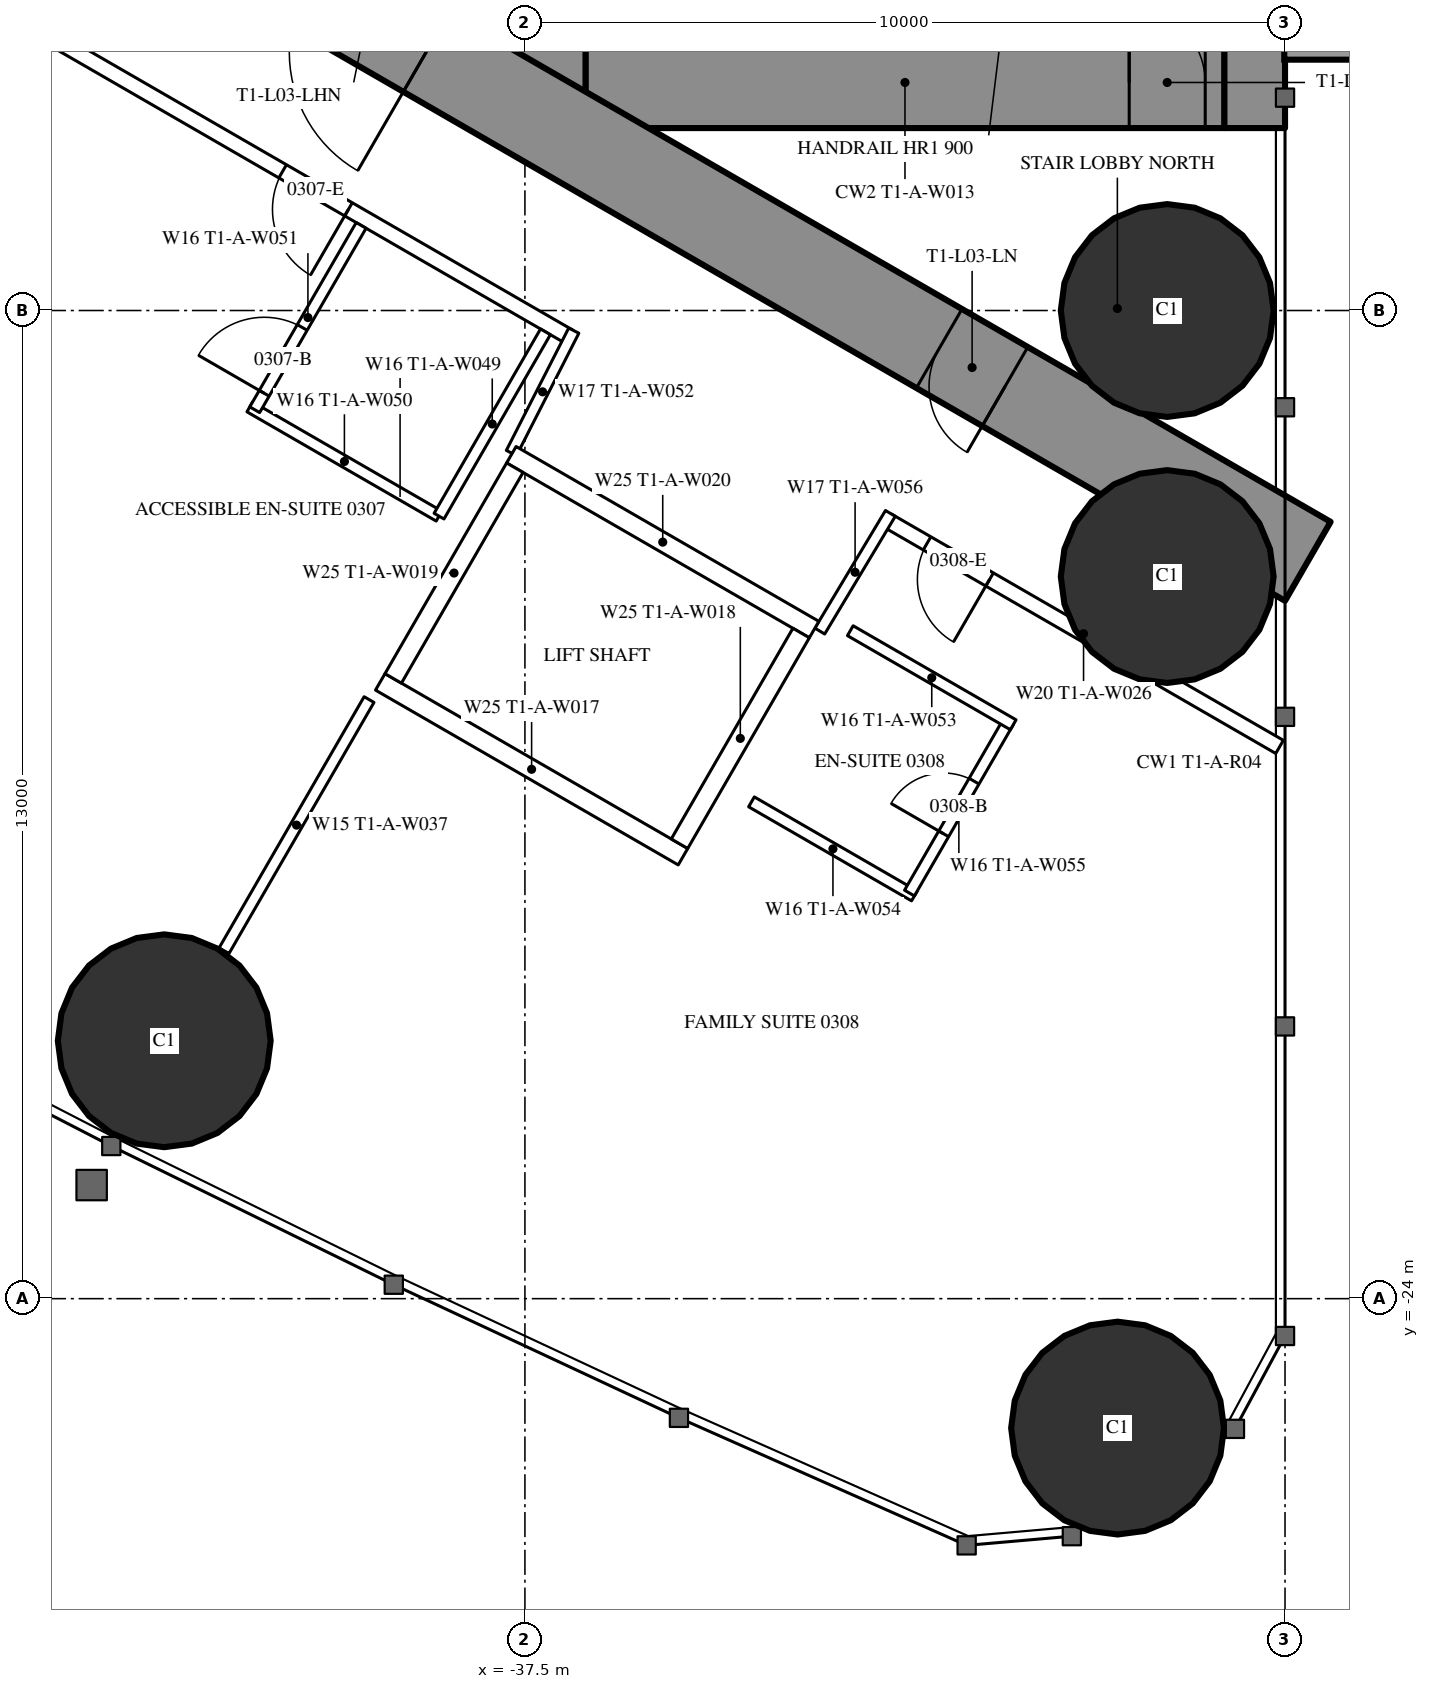
"""IFC4 building model, lengths in metres.
Left out: names, types, materials, properties, quantities, classifications, styles, units other than length and angle.
Written with IfcOpenShell. Run it as: python <this file> out.ifc"""

import sys

from ifc_helpers import new_model, si_unit, direction, frame, frame_2d, origin, origin_2d, place, context, subcontext, project, spatial, rectangle, hollow_circle, extrude, element, fill, save


model = new_model("IFC4")
c1 = context("Model", 3, precision=1e-05, world=origin(), true_north=direction((0.0, 1.0)))
c2 = subcontext(c1, "Body", "Model", "MODEL_VIEW")
j1 = project(units=[si_unit("LENGTHUNIT", "METRE"), si_unit("PLANEANGLEUNIT", "RADIAN")], contexts=[c1])
p1 = place(None, origin())
s1 = spatial("IfcSite", under=j1, at=p1, CompositionType="ELEMENT")
p2 = place(p1, origin())
s2 = spatial("IfcBuilding", under=s1, at=p2, CompositionType="ELEMENT")
p3 = place(p2, frame((0.0, 0.0, 18.0)))
s3 = spatial("IfcBuildingStorey", under=s2, at=p3, CompositionType="ELEMENT", Elevation=18.0)
for number, where, z_axis, x_axis in (
    (1, (-29.703, -25.703, 0.0), (0.0, 0.0, 1.0), (1.0, 0.0, 0.0)),
    (2, (-29.05, -11.0, 0.0), (0.0, 0.0, 1.0), (1.0, 0.0, 0.0)),
    (3, (-29.05, -14.5, 0.0), (0.0, 0.0, 1.0), (1.0, 0.0, 0.0)),
    (4, (-42.245, -20.607, 0.0), (0.0, 0.0, 1.0), (1.0, 0.0, 0.0)),
):
    element("IfcColumn", number, at=place(p3, frame(where, z_axis=z_axis, x_axis=x_axis)), inside=s3, PredefinedType="COLUMN", context=c2, shape_type="SweptSolid", body=[
        extrude(hollow_circle(Radius=1.4, WallThickness=0.12, at=origin_2d()), origin(), (0.0, 0.0, 1.0), 3.5),
    ])
p4 = place(p3, frame((-27.9, 8.6, 0.0), z_axis=(0.0, 0.0, 1.0), x_axis=(0.0, -1.0, 0.0)))
e5 = element("IfcWall", 5, at=p4, inside=s3, PredefinedType="SHEAR", context=c2, shape_type="SweptSolid", body=[
    extrude(rectangle(XDim=17.2, YDim=0.8, at=frame_2d((8.6, 0.0))), origin(), (0.0, 0.0, 1.0), 3.5),
])
p5 = place(p4, frame((2.45, 0.0, 0.6)))
e6 = element("IfcOpeningElement", 6, at=p5, cuts=e5, PredefinedType="OPENING", context=c2, shape_type="SweptSolid", body=[
    extrude(rectangle(XDim=0.6, YDim=2.1, at=frame_2d((0.3, 1.05))), frame((0.0, 0.41, 0.0), z_axis=(0.0, -1.0, 0.0), x_axis=(1.0, 0.0, 0.0)), (0.0, 0.0, 1.0), 0.82),
])
p6 = place(p4, frame((14.15, 0.0, 0.6)))
e7 = element("IfcOpeningElement", 7, at=p6, cuts=e5, PredefinedType="OPENING", context=c2, shape_type="SweptSolid", body=[
    extrude(rectangle(XDim=0.6, YDim=2.1, at=frame_2d((0.3, 1.05))), frame((0.0, 0.41, 0.0), z_axis=(0.0, -1.0, 0.0), x_axis=(1.0, 0.0, 0.0)), (0.0, 0.0, 1.0), 0.82),
])
p7 = place(p3, frame((-37.3, 8.6, 0.0), z_axis=(0.0, 0.0, 1.0), x_axis=(0.0, -1.0, 0.0)))
e8 = element("IfcWall", 8, at=p7, inside=s3, PredefinedType="SHEAR", context=c2, shape_type="SweptSolid", body=[
    extrude(rectangle(XDim=17.2, YDim=1.2, at=frame_2d((8.6, 0.0))), origin(), (0.0, 0.0, 1.0), 3.5),
])
p8 = place(p7, frame((7.7, 0.0, 0.0)))
e9 = element("IfcOpeningElement", 9, at=p8, cuts=e8, PredefinedType="OPENING", context=c2, shape_type="SweptSolid", body=[
    extrude(rectangle(XDim=1.8, YDim=2.2, at=frame_2d((0.9, 1.1))), frame((0.0, 0.61, 0.0), z_axis=(0.0, -1.0, 0.0), x_axis=(1.0, 0.0, 0.0)), (0.0, 0.0, 1.0), 1.22),
])
p9 = place(p3, frame((-28.3, -8.0, 0.0), z_axis=(0.0, 0.0, 1.0), x_axis=(-1.0, 0.0, 0.0)))
e10 = element("IfcWall", 10, at=p9, inside=s3, PredefinedType="SHEAR", context=c2, shape_type="SweptSolid", body=[
    extrude(rectangle(XDim=8.4, YDim=1.2, at=frame_2d((4.2, 0.0))), origin(), (0.0, 0.0, 1.0), 3.5),
])
p10 = place(p9, frame((0.25, 0.0, 0.0)))
e11 = element("IfcOpeningElement", 11, at=p10, cuts=e10, PredefinedType="OPENING", context=c2, shape_type="SweptSolid", body=[
    extrude(rectangle(XDim=1.0, YDim=2.2, at=frame_2d((0.5, 1.1))), frame((0.0, 0.61, 0.0), z_axis=(0.0, -1.0, 0.0), x_axis=(1.0, 0.0, 0.0)), (0.0, 0.0, 1.0), 1.22),
])
p11 = place(p3, frame((-27.2, -14.3, 0.0), z_axis=(0.0, 0.0, 1.0), x_axis=(-0.866024021859, 0.500002393557, 0.0)))
e12 = element("IfcWall", 12, at=p11, inside=s3, PredefinedType="SHEAR", context=c2, shape_type="SweptSolid", body=[
    extrude(rectangle(XDim=27.907, YDim=1.2, at=frame_2d((13.954, 0.0))), origin(), (0.0, 0.0, 1.0), 3.5),
])
p12 = place(p11, frame((4.6, 0.0, 0.0)))
e13 = element("IfcOpeningElement", 13, at=p12, cuts=e12, PredefinedType="OPENING", context=c2, shape_type="SweptSolid", body=[
    extrude(rectangle(XDim=1.0, YDim=2.2, at=frame_2d((0.5, 1.1))), frame((0.0, 0.61, 0.0), z_axis=(0.0, -1.0, 0.0), x_axis=(1.0, 0.0, 0.0)), (0.0, 0.0, 1.0), 1.22),
])
p13 = place(p11, frame((13.395, 0.0, 0.0)))
e14 = element("IfcOpeningElement", 14, at=p13, cuts=e12, PredefinedType="OPENING", context=c2, shape_type="SweptSolid", body=[
    extrude(rectangle(XDim=1.8, YDim=2.2, at=frame_2d((0.9, 1.1))), frame((0.0, 0.61, 0.0), z_axis=(0.0, -1.0, 0.0), x_axis=(1.0, 0.0, 0.0)), (0.0, 0.0, 1.0), 1.22),
])
p14 = place(p3, frame((-39.551, -16.118, 0.0), z_axis=(0.0, 0.0, 1.0), x_axis=(-0.499986503906, -0.866033195618, 0.0)))
e15 = element("IfcWall", 15, at=p14, inside=s3, PredefinedType="PARTITIONING", context=c2, shape_type="SweptSolid", body=[
    extrude(rectangle(XDim=3.815, YDim=0.15, at=frame_2d((1.907, 0.0))), origin(), (0.0, 0.0, 1.0), 3.25),
])
p15 = place(p3, frame((-27.572, -16.741, 0.0), z_axis=(0.0, 0.0, 1.0), x_axis=(-0.866024464444, 0.500001626982, 0.0)))
e16 = element("IfcWall", 16, at=p15, inside=s3, PredefinedType="PARTITIONING", context=c2, shape_type="SweptSolid", body=[
    extrude(rectangle(XDim=5.955, YDim=0.2, at=frame_2d((2.978, 0.0))), origin(), (0.0, 0.0, 1.0), 3.25),
])
p16 = place(p15, frame((4.405, 0.0, 0.0)))
e17 = element("IfcOpeningElement", 17, at=p16, cuts=e16, PredefinedType="OPENING", context=c2, shape_type="SweptSolid", body=[
    extrude(rectangle(XDim=0.95, YDim=2.2, at=frame_2d((0.475, 1.1))), frame((0.0, 0.11, 0.0), z_axis=(0.0, -1.0, 0.0), x_axis=(1.0, 0.0, 0.0)), (0.0, 0.0, 1.0), 0.22),
])
p17 = place(p3, frame((-36.92, -11.344, 0.0), z_axis=(0.0, 0.0, 1.0), x_axis=(-0.866028313256, 0.499994960614, 0.0)))
e18 = element("IfcWall", 18, at=p17, inside=s3, PredefinedType="PARTITIONING", context=c2, shape_type="SweptSolid", body=[
    extrude(rectangle(XDim=22.568, YDim=0.2, at=frame_2d((11.284, 0.0))), origin(), (0.0, 0.0, 1.0), 3.25),
])
p18 = place(p17, frame((15.03, 0.0, 0.0)))
e19 = element("IfcOpeningElement", 19, at=p18, cuts=e18, PredefinedType="OPENING", context=c2, shape_type="SweptSolid", body=[
    extrude(rectangle(XDim=0.95, YDim=2.2, at=frame_2d((0.475, 1.1))), frame((0.0, 0.11, 0.0), z_axis=(0.0, -1.0, 0.0), x_axis=(1.0, 0.0, 0.0)), (0.0, 0.0, 1.0), 0.22),
])
p19 = place(p17, frame((3.35, 0.0, 0.0)))
e20 = element("IfcOpeningElement", 20, at=p19, cuts=e18, PredefinedType="OPENING", context=c2, shape_type="SweptSolid", body=[
    extrude(rectangle(XDim=1.0, YDim=2.2, at=frame_2d((0.5, 1.1))), frame((0.0, 0.11, 0.0), z_axis=(0.0, -1.0, 0.0), x_axis=(1.0, 0.0, 0.0)), (0.0, 0.0, 1.0), 0.22),
])
p20 = place(p3, frame((-36.857, -11.265, 0.0), z_axis=(0.0, 0.0, 1.0), x_axis=(-0.454225294761, -0.890886851176, 0.0)))
e21 = element("IfcWall", 21, at=p20, inside=s3, PredefinedType="PARTITIONING", context=c2, shape_type="SweptSolid", body=[
    extrude(rectangle(XDim=1.807, YDim=0.15, at=frame_2d((0.904, 0.0))), origin(), (0.0, 0.0, 1.0), 3.25),
])
p21 = place(p3, frame((-33.621, -15.218, 0.0), z_axis=(0.0, 0.0, 1.0), x_axis=(0.514336634837, 0.857588377991, 0.0)))
e22 = element("IfcWall", 22, at=p21, inside=s3, PredefinedType="PARTITIONING", context=c2, shape_type="SweptSolid", body=[
    extrude(rectangle(XDim=1.805, YDim=0.15, at=frame_2d((0.903, 0.0))), origin(), (0.0, 0.0, 1.0), 3.25),
])
p22 = place(p3, frame((-38.63, -13.705, 0.0), z_axis=(0.0, 0.0, 1.0), x_axis=(-0.866018712932, 0.500011588718, 0.0)))
e23 = element("IfcWall", 23, at=p22, inside=s3, PredefinedType="PARTITIONING", context=c2, shape_type="SweptSolid", body=[
    extrude(rectangle(XDim=2.875, YDim=0.15, at=frame_2d((1.438, 0.0))), origin(), (0.0, 0.0, 1.0), 3.25),
])
p23 = place(p3, frame((-39.655, -9.88, 0.0), z_axis=(0.0, 0.0, 1.0), x_axis=(-0.500049511043, -0.865996816683, 0.0)))
e24 = element("IfcWall", 24, at=p23, inside=s3, PredefinedType="PARTITIONING", context=c2, shape_type="SweptSolid", body=[
    extrude(rectangle(XDim=2.8, YDim=0.15, at=frame_2d((1.4, 0.0))), origin(), (0.0, 0.0, 1.0), 3.25),
])
p24 = place(p23, frame((1.55, 0.0, 0.0)))
e25 = element("IfcOpeningElement", 25, at=p24, cuts=e24, PredefinedType="OPENING", context=c2, shape_type="SweptSolid", body=[
    extrude(rectangle(XDim=1.0, YDim=2.2, at=frame_2d((0.5, 1.1))), frame((0.0, 0.085, 0.0), z_axis=(0.0, -1.0, 0.0), x_axis=(1.0, 0.0, 0.0)), (0.0, 0.0, 1.0), 0.17),
])
p25 = place(p3, frame((-37.23, -11.281, 0.0), z_axis=(0.0, 0.0, 1.0), x_axis=(-0.500049511043, -0.865996816683, 0.0)))
e26 = element("IfcWall", 26, at=p25, inside=s3, PredefinedType="PARTITIONING", context=c2, shape_type="SweptSolid", body=[
    extrude(rectangle(XDim=2.8, YDim=0.15, at=frame_2d((1.4, 0.0))), origin(), (0.0, 0.0, 1.0), 3.25),
])
p26 = place(p3, frame((-32.376, -18.702, 0.0), z_axis=(0.0, 0.0, 1.0), x_axis=(-0.866006523861, 0.500032699561, 0.0)))
e27 = element("IfcWall", 27, at=p26, inside=s3, PredefinedType="PARTITIONING", context=c2, shape_type="SweptSolid", body=[
    extrude(rectangle(XDim=2.475, YDim=0.15, at=frame_2d((1.237, 0.0))), origin(), (0.0, 0.0, 1.0), 3.25),
])
p27 = place(p3, frame((-31.141, -16.413, 0.0), z_axis=(0.0, 0.0, 1.0), x_axis=(-0.500006934395, -0.866021400173, 0.0)))
e28 = element("IfcWall", 28, at=p27, inside=s3, PredefinedType="PARTITIONING", context=c2, shape_type="SweptSolid", body=[
    extrude(rectangle(XDim=2.6, YDim=0.15, at=frame_2d((1.3, 0.0))), origin(), (0.0, 0.0, 1.0), 3.25),
])
p28 = place(p27, frame((0.9, 0.0, 0.0)))
e29 = element("IfcOpeningElement", 29, at=p28, cuts=e28, PredefinedType="OPENING", context=c2, shape_type="SweptSolid", body=[
    extrude(rectangle(XDim=0.8, YDim=2.2, at=frame_2d((0.4, 1.1))), frame((0.0, 0.085, 0.0), z_axis=(0.0, -1.0, 0.0), x_axis=(1.0, 0.0, 0.0)), (0.0, 0.0, 1.0), 0.17),
])
p29 = place(p3, frame((-31.076, -16.45, 0.0), z_axis=(0.0, 0.0, 1.0), x_axis=(-0.866073894602, 0.499916002032, 0.0)))
e30 = element("IfcWall", 30, at=p29, inside=s3, PredefinedType="PARTITIONING", context=c2, shape_type="SweptSolid", body=[
    extrude(rectangle(XDim=2.475, YDim=0.15, at=frame_2d((1.238, 0.0))), origin(), (0.0, 0.0, 1.0), 3.25),
])
p30 = place(p3, frame((-33.696, -15.197, 0.0), z_axis=(0.0, 0.0, 1.0), x_axis=(-0.865976953817, 0.500083908417, 0.0)))
e31 = element("IfcWall", 31, at=p30, inside=s3, PredefinedType="PARTITIONING", context=c2, shape_type="SweptSolid", body=[
    extrude(rectangle(XDim=4.599, YDim=0.25, at=frame_2d((2.3, 0.0))), origin(), (0.0, 0.0, 1.0), 3.25),
])
p31 = place(p3, frame((-35.42, -18.186, 0.0), z_axis=(0.0, 0.0, 1.0), x_axis=(-0.865990227814, 0.50006092162, 0.0)))
e32 = element("IfcWall", 32, at=p31, inside=s3, PredefinedType="PARTITIONING", context=c2, shape_type="SweptSolid", body=[
    extrude(rectangle(XDim=4.6, YDim=0.25, at=frame_2d((2.3, 0.0))), origin(), (0.0, 0.0, 1.0), 3.25),
])
p32 = place(p3, frame((-33.866, -15.243, 0.0), z_axis=(0.0, 0.0, 1.0), x_axis=(-0.499929347863, -0.866066190972, 0.0)))
e33 = element("IfcWall", 33, at=p32, inside=s3, PredefinedType="PARTITIONING", context=c2, shape_type="SweptSolid", body=[
    extrude(rectangle(XDim=3.201, YDim=0.25, at=frame_2d((1.6, 0.0))), origin(), (0.0, 0.0, 1.0), 3.25),
])
p33 = place(p3, frame((-37.633, -13.068, 0.0), z_axis=(0.0, 0.0, 1.0), x_axis=(-0.499872130319, -0.866099216793, 0.0)))
e34 = element("IfcWall", 34, at=p33, inside=s3, PredefinedType="PARTITIONING", context=c2, shape_type="SweptSolid", body=[
    extrude(rectangle(XDim=3.2, YDim=0.25, at=frame_2d((1.6, 0.0))), origin(), (0.0, 0.0, 1.0), 3.25),
])
p34 = place(p24, origin())
e35 = element("IfcDoor", 35, at=p34, inside=s3, OperationType="SINGLE_SWING_RIGHT", PredefinedType="DOOR", context=c2, shape_type="SweptSolid", body=[
    extrude(rectangle(XDim=1.0, YDim=2.2, at=frame_2d((0.5, 1.1))), frame((0.0, 0.025, 0.0), z_axis=(0.0, -1.0, 0.0), x_axis=(1.0, 0.0, 0.0)), (0.0, 0.0, 1.0), 0.05),
])
fill(e25, e35)
p35 = place(p19, origin())
e36 = element("IfcDoor", 36, at=p35, inside=s3, OperationType="SINGLE_SWING_LEFT", PredefinedType="DOOR", context=c2, shape_type="SweptSolid", body=[
    extrude(rectangle(XDim=1.0, YDim=2.2, at=frame_2d((0.5, 1.1))), frame((0.0, 0.025, 0.0), z_axis=(0.0, -1.0, 0.0), x_axis=(1.0, 0.0, 0.0)), (0.0, 0.0, 1.0), 0.05),
])
fill(e20, e36)
p36 = place(p28, origin())
e37 = element("IfcDoor", 37, at=p36, inside=s3, OperationType="SINGLE_SWING_RIGHT", PredefinedType="DOOR", context=c2, shape_type="SweptSolid", body=[
    extrude(rectangle(XDim=0.8, YDim=2.2, at=frame_2d((0.4, 1.1))), frame((0.0, 0.025, 0.0), z_axis=(0.0, -1.0, 0.0), x_axis=(1.0, 0.0, 0.0)), (0.0, 0.0, 1.0), 0.05),
])
fill(e29, e37)
p37 = place(p16, origin())
e38 = element("IfcDoor", 38, at=p37, inside=s3, OperationType="SINGLE_SWING_LEFT", PredefinedType="DOOR", context=c2, shape_type="SweptSolid", body=[
    extrude(rectangle(XDim=0.95, YDim=2.2, at=frame_2d((0.475, 1.1))), frame((0.0, 0.025, 0.0), z_axis=(0.0, -1.0, 0.0), x_axis=(1.0, 0.0, 0.0)), (0.0, 0.0, 1.0), 0.05),
])
fill(e17, e38)
p38 = place(p12, origin())
e39 = element("IfcDoor", 39, at=p38, inside=s3, OperationType="SINGLE_SWING_LEFT", PredefinedType="DOOR", context=c2, shape_type="SweptSolid", body=[
    extrude(rectangle(XDim=1.0, YDim=2.2, at=frame_2d((0.5, 1.1))), frame((0.0, 0.025, 0.0), z_axis=(0.0, -1.0, 0.0), x_axis=(1.0, 0.0, 0.0)), (0.0, 0.0, 1.0), 0.05),
])
fill(e13, e39)
p39 = place(p13, origin())
e40 = element("IfcDoor", 40, at=p39, inside=s3, OperationType="DOUBLE_DOOR_SINGLE_SWING", PredefinedType="DOOR", context=c2, shape_type="SweptSolid", body=[
    extrude(rectangle(XDim=1.8, YDim=2.2, at=frame_2d((0.9, 1.1))), frame((0.0, 0.025, 0.0), z_axis=(0.0, -1.0, 0.0), x_axis=(1.0, 0.0, 0.0)), (0.0, 0.0, 1.0), 0.05),
])
fill(e14, e40)
p40 = place(p10, origin())
e41 = element("IfcDoor", 41, at=p40, inside=s3, OperationType="SINGLE_SWING_RIGHT", PredefinedType="DOOR", context=c2, shape_type="SweptSolid", body=[
    extrude(rectangle(XDim=1.0, YDim=2.2, at=frame_2d((0.5, 1.1))), frame((0.0, 0.025, 0.0), z_axis=(0.0, -1.0, 0.0), x_axis=(1.0, 0.0, 0.0)), (0.0, 0.0, 1.0), 0.05),
])
fill(e11, e41)
save(model, sys.argv[1])
